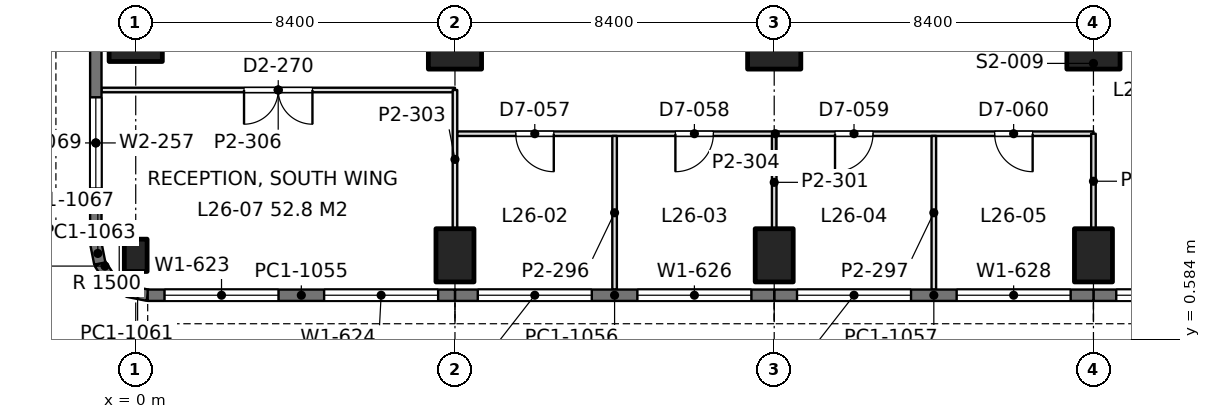
"""IFC4 building model, lengths in metres.
Left out: names, types, materials, properties, quantities, classifications, styles, units other than length and angle.
Written with IfcOpenShell. Run it as: python <this file> out.ifc"""

import sys

from ifc_helpers import new_model, si_unit, direction, frame, frame_2d, origin, origin_2d, place, context, subcontext, project, spatial, rectangle, extrude, element, fill, save


model = new_model("IFC4")
c1 = context("Model", 3, precision=1e-05, world=origin(), true_north=direction((0.0, 1.0)))
c2 = subcontext(c1, "Body", "Model", "MODEL_VIEW")
j1 = project(units=[si_unit("LENGTHUNIT", "METRE"), si_unit("PLANEANGLEUNIT", "RADIAN")], contexts=[c1])
p1 = place(None, origin())
s1 = spatial("IfcSite", under=j1, at=p1, CompositionType="ELEMENT")
p2 = place(p1, origin())
s2 = spatial("IfcBuilding", under=s1, at=p2, CompositionType="ELEMENT")
p3 = place(p2, frame((0.0, 0.0, 117.6)))
s3 = spatial("IfcBuildingStorey", under=s2, at=p3, CompositionType="ELEMENT", Elevation=117.6)
p4 = place(p3, frame((0.0, 2.8, 0.0), z_axis=(0.0, 0.0, 1.0), x_axis=(1.0, 0.0, 0.0)))
e1 = element("IfcColumn", 1, at=p4, inside=s3, PredefinedType="COLUMN", context=c2, shape_type="SweptSolid", body=[
    extrude(rectangle(XDim=0.6, YDim=0.85, at=origin_2d()), origin(), (0.0, 0.0, 1.0), 4.2),
])
for number, where, z_axis, x_axis in (
    (2, (0.0, 8.4, 0.0), (0.0, 0.0, 1.0), (0.0, 1.0, 0.0)),
    (3, (8.4, 2.8, 0.0), (0.0, 0.0, 1.0), (1.0, 0.0, 0.0)),
):
    element("IfcColumn", number, at=place(p3, frame(where, z_axis=z_axis, x_axis=x_axis)), inside=s3, PredefinedType="COLUMN", context=c2, shape_type="SweptSolid", body=[
        extrude(rectangle(XDim=1.0, YDim=1.4, at=origin_2d()), origin(), (0.0, 0.0, 1.0), 4.2),
    ])
p5 = place(p3, frame((8.4, 8.4, 0.0), z_axis=(0.0, 0.0, 1.0), x_axis=(1.0, 0.0, 0.0)))
e4 = element("IfcColumn", 4, at=p5, inside=s3, PredefinedType="COLUMN", context=c2, shape_type="SweptSolid", body=[
    extrude(rectangle(XDim=1.4, YDim=1.4, at=origin_2d()), origin(), (0.0, 0.0, 1.0), 4.2),
])
p6 = place(p3, frame((16.8, 2.8, 0.0), z_axis=(0.0, 0.0, 1.0), x_axis=(1.0, 0.0, 0.0)))
e5 = element("IfcColumn", 5, at=p6, inside=s3, PredefinedType="COLUMN", context=c2, shape_type="SweptSolid", body=[
    extrude(rectangle(XDim=1.0, YDim=1.4, at=origin_2d()), origin(), (0.0, 0.0, 1.0), 4.2),
])
p7 = place(p3, frame((16.8, 8.4, 0.0), z_axis=(0.0, 0.0, 1.0), x_axis=(1.0, 0.0, 0.0)))
e6 = element("IfcColumn", 6, at=p7, inside=s3, PredefinedType="COLUMN", context=c2, shape_type="SweptSolid", body=[
    extrude(rectangle(XDim=1.4, YDim=1.4, at=origin_2d()), origin(), (0.0, 0.0, 1.0), 4.2),
])
p8 = place(p3, frame((25.2, 2.8, 0.0), z_axis=(0.0, 0.0, 1.0), x_axis=(1.0, 0.0, 0.0)))
e7 = element("IfcColumn", 7, at=p8, inside=s3, PredefinedType="COLUMN", context=c2, shape_type="SweptSolid", body=[
    extrude(rectangle(XDim=1.0, YDim=1.4, at=origin_2d()), origin(), (0.0, 0.0, 1.0), 4.2),
])
p9 = place(p3, frame((25.2, 8.4, 0.0), z_axis=(0.0, 0.0, 1.0), x_axis=(1.0, 0.0, 0.0)))
e8 = element("IfcColumn", 8, at=p9, inside=s3, PredefinedType="COLUMN", context=c2, shape_type="SweptSolid", body=[
    extrude(rectangle(XDim=1.4, YDim=1.4, at=origin_2d()), origin(), (0.0, 0.0, 1.0), 4.2),
])
p10 = place(p3, frame((33.6, 1.75, 0.0), z_axis=(0.0, 0.0, 1.0), x_axis=(-1.0, 0.0, 0.0)))
e9 = element("IfcWall", 9, at=p10, inside=s3, PredefinedType="SOLIDWALL", context=c2, shape_type="SweptSolid", body=[
    extrude(rectangle(XDim=8.4, YDim=0.3, at=frame_2d((4.2, 0.0))), origin(), (0.0, 0.0, 1.0), 4.05),
])
p11 = place(p10, frame((0.6, 0.0, 0.9)))
e10 = element("IfcOpeningElement", 10, at=p11, cuts=e9, PredefinedType="OPENING", context=c2, shape_type="SweptSolid", body=[
    extrude(rectangle(XDim=3.0, YDim=1.9, at=frame_2d((1.5, 0.95))), frame((0.0, 0.16, 0.0), z_axis=(0.0, -1.0, 0.0), x_axis=(1.0, 0.0, 0.0)), (0.0, 0.0, 1.0), 0.32),
])
p12 = place(p10, frame((4.8, 0.0, 0.9)))
e11 = element("IfcOpeningElement", 11, at=p12, cuts=e9, PredefinedType="OPENING", context=c2, shape_type="SweptSolid", body=[
    extrude(rectangle(XDim=3.0, YDim=1.9, at=frame_2d((1.5, 0.95))), frame((0.0, 0.16, 0.0), z_axis=(0.0, -1.0, 0.0), x_axis=(1.0, 0.0, 0.0)), (0.0, 0.0, 1.0), 0.32),
])
p13 = place(p3, frame((25.2, 1.75, 0.0), z_axis=(0.0, 0.0, 1.0), x_axis=(-1.0, 0.0, 0.0)))
e12 = element("IfcWall", 12, at=p13, inside=s3, PredefinedType="SOLIDWALL", context=c2, shape_type="SweptSolid", body=[
    extrude(rectangle(XDim=8.4, YDim=0.3, at=frame_2d((4.2, 0.0))), origin(), (0.0, 0.0, 1.0), 4.05),
])
p14 = place(p13, frame((0.6, 0.0, 0.9)))
e13 = element("IfcOpeningElement", 13, at=p14, cuts=e12, PredefinedType="OPENING", context=c2, shape_type="SweptSolid", body=[
    extrude(rectangle(XDim=3.0, YDim=1.9, at=frame_2d((1.5, 0.95))), frame((0.0, 0.16, 0.0), z_axis=(0.0, -1.0, 0.0), x_axis=(1.0, 0.0, 0.0)), (0.0, 0.0, 1.0), 0.32),
])
p15 = place(p13, frame((4.8, 0.0, 0.9)))
e14 = element("IfcOpeningElement", 14, at=p15, cuts=e12, PredefinedType="OPENING", context=c2, shape_type="SweptSolid", body=[
    extrude(rectangle(XDim=3.0, YDim=1.9, at=frame_2d((1.5, 0.95))), frame((0.0, 0.16, 0.0), z_axis=(0.0, -1.0, 0.0), x_axis=(1.0, 0.0, 0.0)), (0.0, 0.0, 1.0), 0.32),
])
p16 = place(p3, frame((16.8, 1.75, 0.0), z_axis=(0.0, 0.0, 1.0), x_axis=(-1.0, 0.0, 0.0)))
e15 = element("IfcWall", 15, at=p16, inside=s3, PredefinedType="SOLIDWALL", context=c2, shape_type="SweptSolid", body=[
    extrude(rectangle(XDim=8.4, YDim=0.3, at=frame_2d((4.2, 0.0))), origin(), (0.0, 0.0, 1.0), 4.05),
])
p17 = place(p16, frame((0.6, 0.0, 0.9)))
e16 = element("IfcOpeningElement", 16, at=p17, cuts=e15, PredefinedType="OPENING", context=c2, shape_type="SweptSolid", body=[
    extrude(rectangle(XDim=3.0, YDim=1.9, at=frame_2d((1.5, 0.95))), frame((0.0, 0.16, 0.0), z_axis=(0.0, -1.0, 0.0), x_axis=(1.0, 0.0, 0.0)), (0.0, 0.0, 1.0), 0.32),
])
p18 = place(p16, frame((4.8, 0.0, 0.9)))
e17 = element("IfcOpeningElement", 17, at=p18, cuts=e15, PredefinedType="OPENING", context=c2, shape_type="SweptSolid", body=[
    extrude(rectangle(XDim=3.0, YDim=1.9, at=frame_2d((1.5, 0.95))), frame((0.0, 0.16, 0.0), z_axis=(0.0, -1.0, 0.0), x_axis=(1.0, 0.0, 0.0)), (0.0, 0.0, 1.0), 0.32),
])
p19 = place(p3, frame((8.4, 1.75, 0.0), z_axis=(0.0, 0.0, 1.0), x_axis=(-1.0, 0.0, 0.0)))
e18 = element("IfcWall", 18, at=p19, inside=s3, PredefinedType="SOLIDWALL", context=c2, shape_type="SweptSolid", body=[
    extrude(rectangle(XDim=8.085, YDim=0.3, at=frame_2d((4.042, 0.0))), origin(), (0.0, 0.0, 1.0), 4.05),
])
p20 = place(p19, frame((0.443, 0.0, 0.9)))
e19 = element("IfcOpeningElement", 19, at=p20, cuts=e18, PredefinedType="OPENING", context=c2, shape_type="SweptSolid", body=[
    extrude(rectangle(XDim=3.0, YDim=1.9, at=frame_2d((1.5, 0.95))), frame((0.0, 0.16, 0.0), z_axis=(0.0, -1.0, 0.0), x_axis=(1.0, 0.0, 0.0)), (0.0, 0.0, 1.0), 0.32),
])
p21 = place(p19, frame((4.643, 0.0, 0.9)))
e20 = element("IfcOpeningElement", 20, at=p21, cuts=e18, PredefinedType="OPENING", context=c2, shape_type="SweptSolid", body=[
    extrude(rectangle(XDim=3.0, YDim=1.9, at=frame_2d((1.5, 0.95))), frame((0.0, 0.16, 0.0), z_axis=(0.0, -1.0, 0.0), x_axis=(1.0, 0.0, 0.0)), (0.0, 0.0, 1.0), 0.32),
])
p22 = place(p3, frame((0.315, 1.75, 0.0), z_axis=(0.0, 0.0, 1.0), x_axis=(-0.980788534345, 0.195073962632, 0.0)))
e21 = element("IfcWall", 21, at=p22, inside=s3, PredefinedType="SOLIDWALL", context=c2, shape_type="SweptSolid", body=[
    extrude(rectangle(XDim=0.541, YDim=0.3, at=frame_2d((0.271, 0.0))), origin(), (0.0, 0.0, 1.0), 4.05),
])
for number, where, z_axis, x_axis in (
    (22, (-0.216, 1.855, 0.0), (0.0, 0.0, 1.0), (-0.831, 0.556, 0.0)),
    (23, (-0.653, 2.147, 0.0), (0.0, 0.0, 1.0), (-0.556, 0.831, 0.0)),
):
    element("IfcWall", number, at=place(p3, frame(where, z_axis=z_axis, x_axis=x_axis)), inside=s3, PredefinedType="SOLIDWALL", context=c2, shape_type="SweptSolid", body=[
        extrude(rectangle(XDim=0.526, YDim=0.3, at=frame_2d((0.263, 0.0))), origin(), (0.0, 0.0, 1.0), 4.05),
    ])
p23 = place(p3, frame((-0.945, 2.584, 0.0), z_axis=(0.0, 0.0, 1.0), x_axis=(-0.195073962632, 0.980788534345, 0.0)))
e24 = element("IfcWall", 24, at=p23, inside=s3, PredefinedType="SOLIDWALL", context=c2, shape_type="SweptSolid", body=[
    extrude(rectangle(XDim=0.541, YDim=0.3, at=frame_2d((0.271, 0.0))), origin(), (0.0, 0.0, 1.0), 4.05),
])
p24 = place(p3, frame((-1.05, 3.115, 0.0), z_axis=(0.0, 0.0, 1.0), x_axis=(0.0, 1.0, 0.0)))
e25 = element("IfcWall", 25, at=p24, inside=s3, PredefinedType="SOLIDWALL", context=c2, shape_type="SweptSolid", body=[
    extrude(rectangle(XDim=5.285, YDim=0.3, at=frame_2d((2.643, 0.0))), origin(), (0.0, 0.0, 1.0), 4.05),
])
p25 = place(p24, frame((1.443, 0.0, 0.9)))
e26 = element("IfcOpeningElement", 26, at=p25, cuts=e25, PredefinedType="OPENING", context=c2, shape_type="SweptSolid", body=[
    extrude(rectangle(XDim=2.4, YDim=1.9, at=frame_2d((1.2, 0.95))), frame((0.0, 0.16, 0.0), z_axis=(0.0, -1.0, 0.0), x_axis=(1.0, 0.0, 0.0)), (0.0, 0.0, 1.0), 0.32),
])
p26 = place(p3, frame((-0.902, 7.15, 0.0), z_axis=(0.0, 0.0, 1.0), x_axis=(1.0, 0.0, 0.0)))
e27 = element("IfcWall", 27, at=p26, inside=s3, PredefinedType="PARTITIONING", context=c2, shape_type="SweptSolid", body=[
    extrude(rectangle(XDim=9.302, YDim=0.12, at=frame_2d((4.651, 0.0))), origin(), (0.0, 0.0, 1.0), 3.55),
])
p27 = place(p26, frame((3.752, 0.0, 0.0)))
e28 = element("IfcOpeningElement", 28, at=p27, cuts=e27, PredefinedType="OPENING", context=c2, shape_type="SweptSolid", body=[
    extrude(rectangle(XDim=1.8, YDim=2.2, at=frame_2d((0.9, 1.1))), frame((0.0, 0.07, 0.0), z_axis=(0.0, -1.0, 0.0), x_axis=(1.0, 0.0, 0.0)), (0.0, 0.0, 1.0), 0.14),
])
p28 = place(p3, frame((8.458, 6.0, 0.0), z_axis=(0.0, 0.0, 1.0), x_axis=(1.0, 0.0, 0.0)))
e29 = element("IfcWall", 29, at=p28, inside=s3, PredefinedType="PARTITIONING", context=c2, shape_type="SweptSolid", body=[
    extrude(rectangle(XDim=16.742, YDim=0.12, at=frame_2d((8.371, 0.0))), origin(), (0.0, 0.0, 1.0), 3.55),
])
p29 = place(p28, frame((1.542, 0.0, 0.0)))
e30 = element("IfcOpeningElement", 30, at=p29, cuts=e29, PredefinedType="OPENING", context=c2, shape_type="SweptSolid", body=[
    extrude(rectangle(XDim=1.0, YDim=2.4, at=frame_2d((0.5, 1.2))), frame((0.0, 0.07, 0.0), z_axis=(0.0, -1.0, 0.0), x_axis=(1.0, 0.0, 0.0)), (0.0, 0.0, 1.0), 0.14),
])
p30 = place(p28, frame((5.742, 0.0, 0.0)))
e31 = element("IfcOpeningElement", 31, at=p30, cuts=e29, PredefinedType="OPENING", context=c2, shape_type="SweptSolid", body=[
    extrude(rectangle(XDim=1.0, YDim=2.4, at=frame_2d((0.5, 1.2))), frame((0.0, 0.07, 0.0), z_axis=(0.0, -1.0, 0.0), x_axis=(1.0, 0.0, 0.0)), (0.0, 0.0, 1.0), 0.14),
])
p31 = place(p28, frame((9.942, 0.0, 0.0)))
e32 = element("IfcOpeningElement", 32, at=p31, cuts=e29, PredefinedType="OPENING", context=c2, shape_type="SweptSolid", body=[
    extrude(rectangle(XDim=1.0, YDim=2.4, at=frame_2d((0.5, 1.2))), frame((0.0, 0.07, 0.0), z_axis=(0.0, -1.0, 0.0), x_axis=(1.0, 0.0, 0.0)), (0.0, 0.0, 1.0), 0.14),
])
p32 = place(p28, frame((14.142, 0.0, 0.0)))
e33 = element("IfcOpeningElement", 33, at=p32, cuts=e29, PredefinedType="OPENING", context=c2, shape_type="SweptSolid", body=[
    extrude(rectangle(XDim=1.0, YDim=2.4, at=frame_2d((0.5, 1.2))), frame((0.0, 0.07, 0.0), z_axis=(0.0, -1.0, 0.0), x_axis=(1.0, 0.0, 0.0)), (0.0, 0.0, 1.0), 0.14),
])
p33 = place(p3, frame((8.4, 3.499, 0.0), z_axis=(0.0, 0.0, 1.0), x_axis=(0.0, 1.0, 0.0)))
e34 = element("IfcWall", 34, at=p33, inside=s3, PredefinedType="PARTITIONING", context=c2, shape_type="SweptSolid", body=[
    extrude(rectangle(XDim=3.651, YDim=0.12, at=frame_2d((1.825, 0.0))), origin(), (0.0, 0.0, 1.0), 3.55),
])
p34 = place(p3, frame((12.6, 1.898, 0.0), z_axis=(0.0, 0.0, 1.0), x_axis=(0.0, 1.0, 0.0)))
e35 = element("IfcWall", 35, at=p34, inside=s3, PredefinedType="PARTITIONING", context=c2, shape_type="SweptSolid", body=[
    extrude(rectangle(XDim=4.044, YDim=0.12, at=frame_2d((2.022, 0.0))), origin(), (0.0, 0.0, 1.0), 3.56),
])
p35 = place(p3, frame((16.8, 3.499, 0.0), z_axis=(0.0, 0.0, 1.0), x_axis=(0.0, 1.0, 0.0)))
e36 = element("IfcWall", 36, at=p35, inside=s3, PredefinedType="PARTITIONING", context=c2, shape_type="SweptSolid", body=[
    extrude(rectangle(XDim=2.443, YDim=0.12, at=frame_2d((1.221, 0.0))), origin(), (0.0, 0.0, 1.0), 3.55),
])
p36 = place(p3, frame((21.0, 1.898, 0.0), z_axis=(0.0, 0.0, 1.0), x_axis=(0.0, 1.0, 0.0)))
e37 = element("IfcWall", 37, at=p36, inside=s3, PredefinedType="PARTITIONING", context=c2, shape_type="SweptSolid", body=[
    extrude(rectangle(XDim=4.044, YDim=0.12, at=frame_2d((2.022, 0.0))), origin(), (0.0, 0.0, 1.0), 3.56),
])
p37 = place(p3, frame((25.2, 3.499, 0.0), z_axis=(0.0, 0.0, 1.0), x_axis=(0.0, 1.0, 0.0)))
e38 = element("IfcWall", 38, at=p37, inside=s3, PredefinedType="PARTITIONING", context=c2, shape_type="SweptSolid", body=[
    extrude(rectangle(XDim=2.501, YDim=0.12, at=frame_2d((1.25, 0.0))), origin(), (0.0, 0.0, 1.0), 3.55),
])
p38 = place(p12, origin())
e39 = element("IfcWindow", 39, at=p38, inside=s3, PartitioningType="SINGLE_PANEL", PredefinedType="WINDOW", context=c2, shape_type="SweptSolid", body=[
    extrude(rectangle(XDim=3.0, YDim=1.9, at=frame_2d((1.5, 0.95))), frame((0.0, 0.03, 0.0), z_axis=(0.0, -1.0, 0.0), x_axis=(1.0, 0.0, 0.0)), (0.0, 0.0, 1.0), 0.06),
])
fill(e11, e39)
p39 = place(p14, origin())
e40 = element("IfcWindow", 40, at=p39, inside=s3, PartitioningType="SINGLE_PANEL", PredefinedType="WINDOW", context=c2, shape_type="SweptSolid", body=[
    extrude(rectangle(XDim=3.0, YDim=1.9, at=frame_2d((1.5, 0.95))), frame((0.0, 0.03, 0.0), z_axis=(0.0, -1.0, 0.0), x_axis=(1.0, 0.0, 0.0)), (0.0, 0.0, 1.0), 0.06),
])
fill(e13, e40)
p40 = place(p15, origin())
e41 = element("IfcWindow", 41, at=p40, inside=s3, PartitioningType="SINGLE_PANEL", PredefinedType="WINDOW", context=c2, shape_type="SweptSolid", body=[
    extrude(rectangle(XDim=3.0, YDim=1.9, at=frame_2d((1.5, 0.95))), frame((0.0, 0.03, 0.0), z_axis=(0.0, -1.0, 0.0), x_axis=(1.0, 0.0, 0.0)), (0.0, 0.0, 1.0), 0.06),
])
fill(e14, e41)
p41 = place(p17, origin())
e42 = element("IfcWindow", 42, at=p41, inside=s3, PartitioningType="SINGLE_PANEL", PredefinedType="WINDOW", context=c2, shape_type="SweptSolid", body=[
    extrude(rectangle(XDim=3.0, YDim=1.9, at=frame_2d((1.5, 0.95))), frame((0.0, 0.03, 0.0), z_axis=(0.0, -1.0, 0.0), x_axis=(1.0, 0.0, 0.0)), (0.0, 0.0, 1.0), 0.06),
])
fill(e16, e42)
p42 = place(p18, origin())
e43 = element("IfcWindow", 43, at=p42, inside=s3, PartitioningType="SINGLE_PANEL", PredefinedType="WINDOW", context=c2, shape_type="SweptSolid", body=[
    extrude(rectangle(XDim=3.0, YDim=1.9, at=frame_2d((1.5, 0.95))), frame((0.0, 0.03, 0.0), z_axis=(0.0, -1.0, 0.0), x_axis=(1.0, 0.0, 0.0)), (0.0, 0.0, 1.0), 0.06),
])
fill(e17, e43)
p43 = place(p20, origin())
e44 = element("IfcWindow", 44, at=p43, inside=s3, PartitioningType="SINGLE_PANEL", PredefinedType="WINDOW", context=c2, shape_type="SweptSolid", body=[
    extrude(rectangle(XDim=3.0, YDim=1.9, at=frame_2d((1.5, 0.95))), frame((0.0, 0.03, 0.0), z_axis=(0.0, -1.0, 0.0), x_axis=(1.0, 0.0, 0.0)), (0.0, 0.0, 1.0), 0.06),
])
fill(e19, e44)
p44 = place(p21, origin())
e45 = element("IfcWindow", 45, at=p44, inside=s3, PartitioningType="SINGLE_PANEL", PredefinedType="WINDOW", context=c2, shape_type="SweptSolid", body=[
    extrude(rectangle(XDim=3.0, YDim=1.9, at=frame_2d((1.5, 0.95))), frame((0.0, 0.03, 0.0), z_axis=(0.0, -1.0, 0.0), x_axis=(1.0, 0.0, 0.0)), (0.0, 0.0, 1.0), 0.06),
])
fill(e20, e45)
p45 = place(p25, origin())
e46 = element("IfcWindow", 46, at=p45, inside=s3, PartitioningType="SINGLE_PANEL", PredefinedType="WINDOW", context=c2, shape_type="SweptSolid", body=[
    extrude(rectangle(XDim=2.4, YDim=1.9, at=frame_2d((1.2, 0.95))), frame((0.0, 0.03, 0.0), z_axis=(0.0, -1.0, 0.0), x_axis=(1.0, 0.0, 0.0)), (0.0, 0.0, 1.0), 0.06),
])
fill(e26, e46)
p46 = place(p27, frame((1.8, 0.0, 0.0), z_axis=(0.0, 0.0, 1.0), x_axis=(-1.0, 0.0, 0.0)))
e47 = element("IfcDoor", 47, at=p46, inside=s3, OperationType="DOUBLE_DOOR_SINGLE_SWING", PredefinedType="DOOR", context=c2, shape_type="SweptSolid", body=[
    extrude(rectangle(XDim=1.8, YDim=2.2, at=frame_2d((0.9, 1.1))), frame((0.0, 0.025, 0.0), z_axis=(0.0, -1.0, 0.0), x_axis=(1.0, 0.0, 0.0)), (0.0, 0.0, 1.0), 0.05),
])
fill(e28, e47)
p47 = place(p29, frame((1.0, 0.0, 0.0), z_axis=(0.0, 0.0, 1.0), x_axis=(-1.0, 0.0, 0.0)))
e48 = element("IfcDoor", 48, at=p47, inside=s3, OperationType="SINGLE_SWING_LEFT", PredefinedType="DOOR", context=c2, shape_type="SweptSolid", body=[
    extrude(rectangle(XDim=1.0, YDim=2.4, at=frame_2d((0.5, 1.2))), frame((0.0, 0.025, 0.0), z_axis=(0.0, -1.0, 0.0), x_axis=(1.0, 0.0, 0.0)), (0.0, 0.0, 1.0), 0.05),
])
fill(e30, e48)
p48 = place(p30, frame((1.0, 0.0, 0.0), z_axis=(0.0, 0.0, 1.0), x_axis=(-1.0, 0.0, 0.0)))
e49 = element("IfcDoor", 49, at=p48, inside=s3, OperationType="SINGLE_SWING_RIGHT", PredefinedType="DOOR", context=c2, shape_type="SweptSolid", body=[
    extrude(rectangle(XDim=1.0, YDim=2.4, at=frame_2d((0.5, 1.2))), frame((0.0, 0.025, 0.0), z_axis=(0.0, -1.0, 0.0), x_axis=(1.0, 0.0, 0.0)), (0.0, 0.0, 1.0), 0.05),
])
fill(e31, e49)
p49 = place(p31, frame((1.0, 0.0, 0.0), z_axis=(0.0, 0.0, 1.0), x_axis=(-1.0, 0.0, 0.0)))
e50 = element("IfcDoor", 50, at=p49, inside=s3, OperationType="SINGLE_SWING_RIGHT", PredefinedType="DOOR", context=c2, shape_type="SweptSolid", body=[
    extrude(rectangle(XDim=1.0, YDim=2.4, at=frame_2d((0.5, 1.2))), frame((0.0, 0.025, 0.0), z_axis=(0.0, -1.0, 0.0), x_axis=(1.0, 0.0, 0.0)), (0.0, 0.0, 1.0), 0.05),
])
fill(e32, e50)
p50 = place(p32, frame((1.0, 0.0, 0.0), z_axis=(0.0, 0.0, 1.0), x_axis=(-1.0, 0.0, 0.0)))
e51 = element("IfcDoor", 51, at=p50, inside=s3, OperationType="SINGLE_SWING_LEFT", PredefinedType="DOOR", context=c2, shape_type="SweptSolid", body=[
    extrude(rectangle(XDim=1.0, YDim=2.4, at=frame_2d((0.5, 1.2))), frame((0.0, 0.025, 0.0), z_axis=(0.0, -1.0, 0.0), x_axis=(1.0, 0.0, 0.0)), (0.0, 0.0, 1.0), 0.05),
])
fill(e33, e51)
save(model, sys.argv[1])
